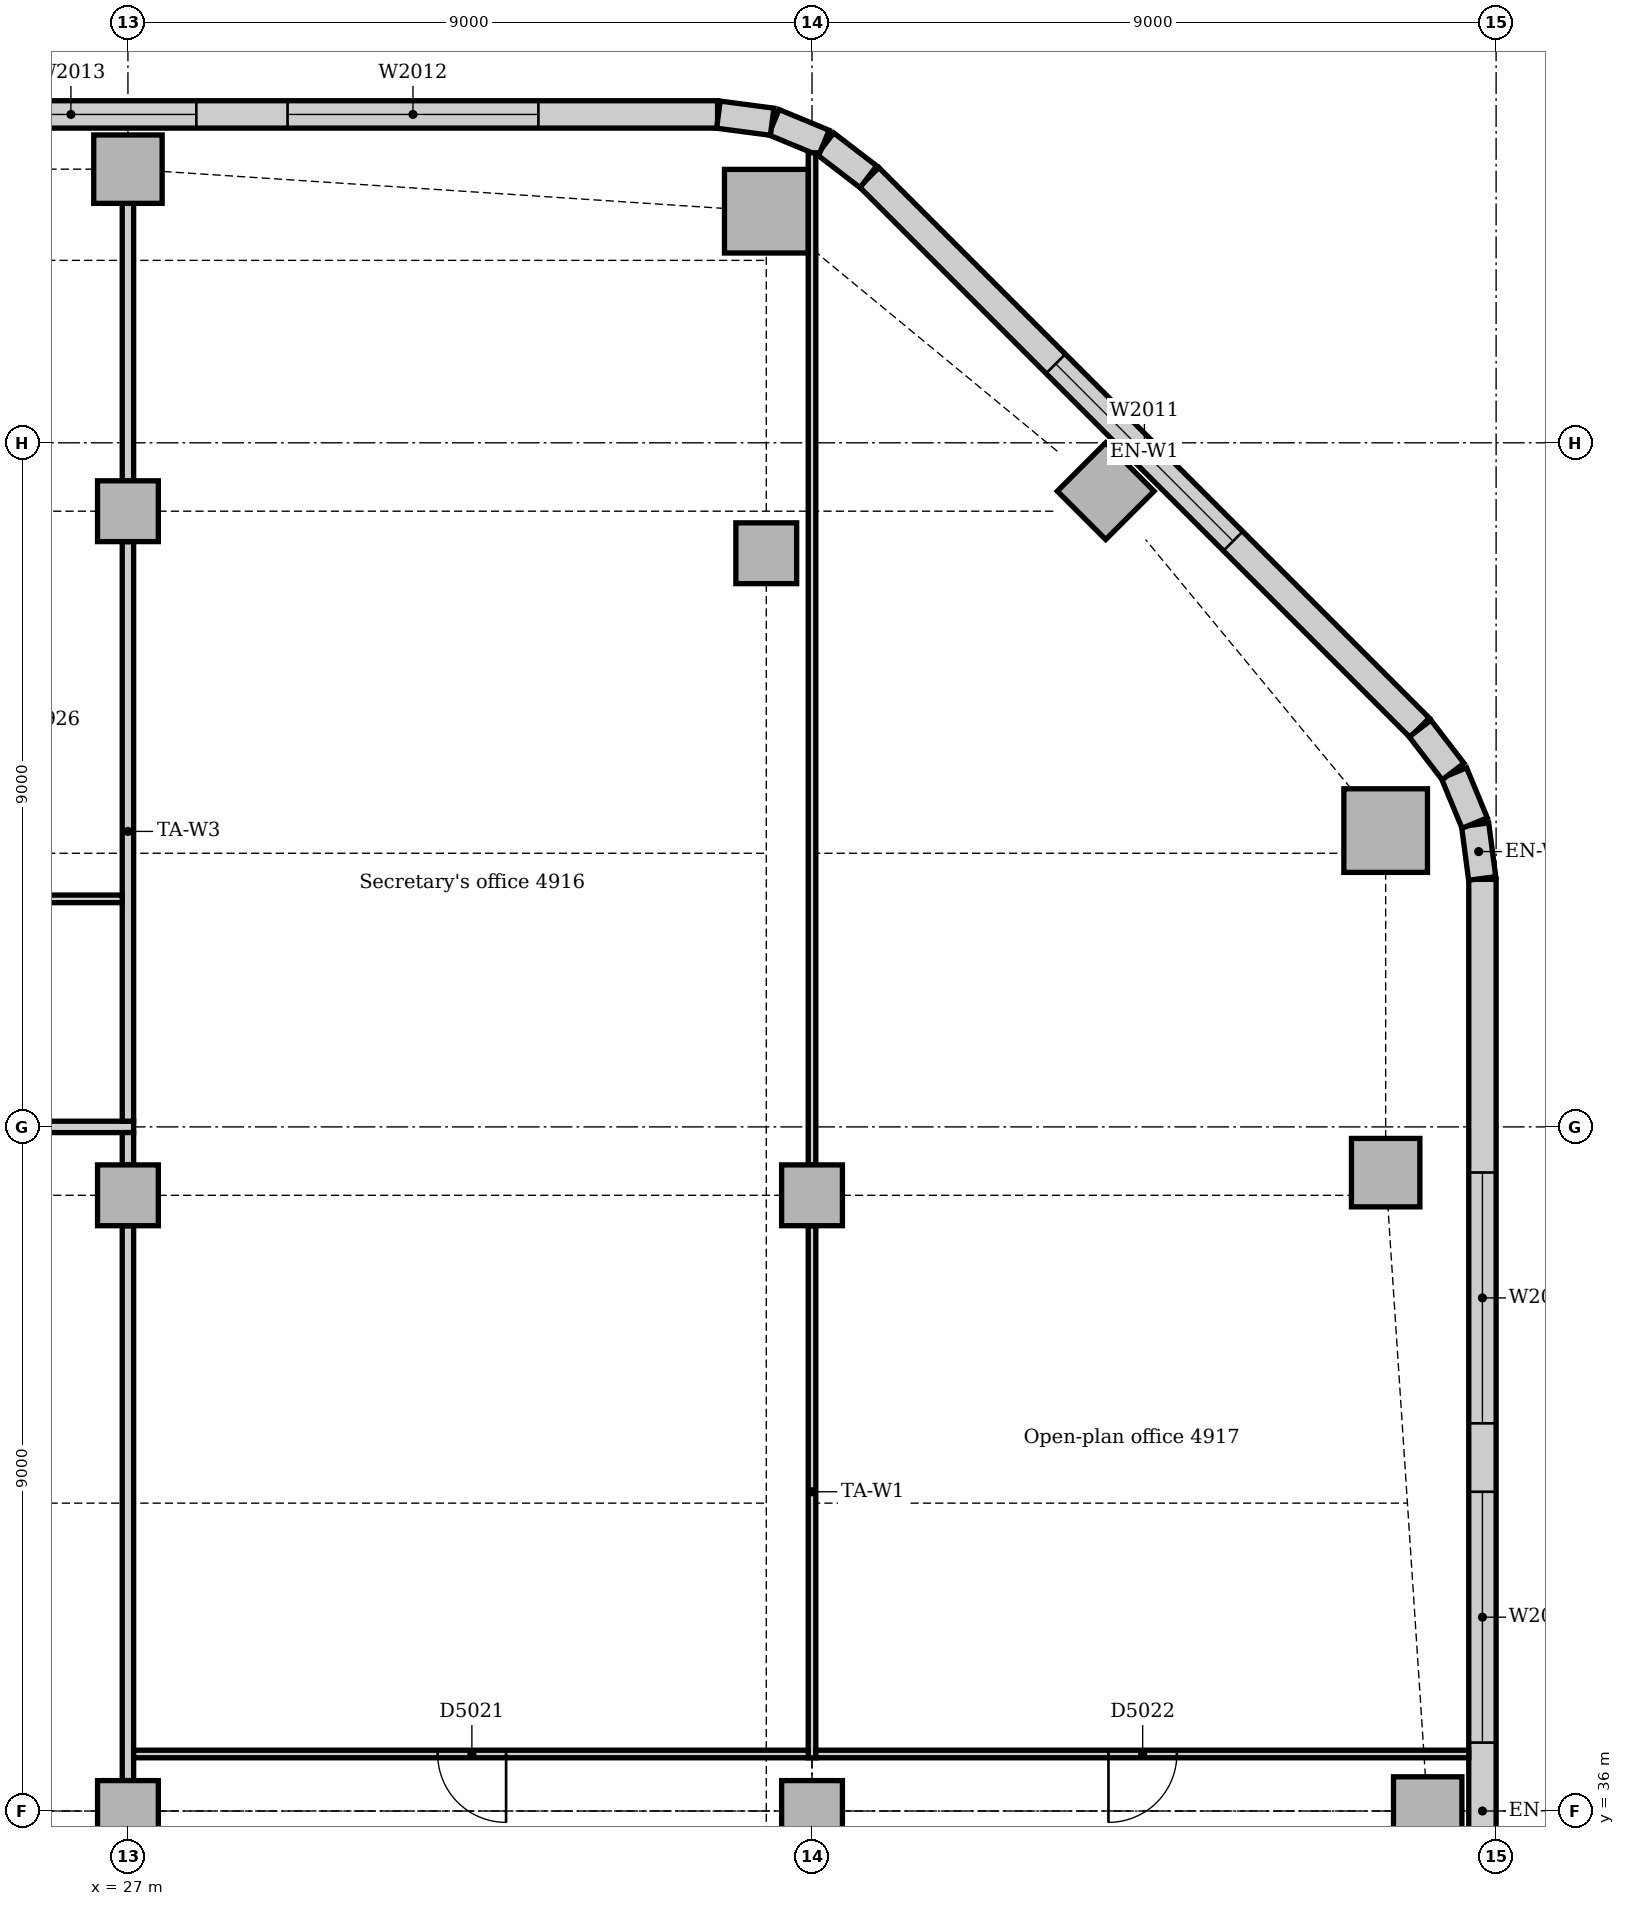
"""IFC4 building model, lengths in metres.
Left out: names, types, materials, properties, quantities, classifications, styles, units other than length and angle.
Written with IfcOpenShell. Run it as: python <this file> out.ifc"""

import sys

from ifc_helpers import new_model, si_unit, direction, frame, frame_2d, origin, origin_2d, place, context, subcontext, project, spatial, rectangle, extrude, element, fill, save


model = new_model("IFC4")
c1 = context("Model", 3, precision=1e-05, world=origin(), true_north=direction((0.0, 1.0)))
c2 = subcontext(c1, "Body", "Model", "MODEL_VIEW")
j1 = project(units=[si_unit("LENGTHUNIT", "METRE"), si_unit("PLANEANGLEUNIT", "RADIAN")], contexts=[c1])
p1 = place(None, origin())
s1 = spatial("IfcSite", under=j1, at=p1, CompositionType="ELEMENT")
p2 = place(p1, origin())
s2 = spatial("IfcBuilding", under=s1, at=p2, CompositionType="ELEMENT")
p3 = place(p2, frame((0.0, 0.0, 206.0)))
s3 = spatial("IfcBuildingStorey", under=s2, at=p3, CompositionType="ELEMENT", Elevation=206.0)
for number, where, z_axis, x_axis in (
    (1, (43.547, 48.898, 0.0), (0.0, 0.0, 1.0), (1.0, 0.0, 0.0)),
    (2, (35.398, 57.047, 0.0), (0.0, 0.0, 1.0), (1.0, 0.0, 0.0)),
):
    element("IfcColumn", number, at=place(p3, frame(where, z_axis=z_axis, x_axis=x_axis)), inside=s3, PredefinedType="COLUMN", context=c2, shape_type="SweptSolid", body=[
        extrude(rectangle(XDim=1.1, YDim=1.1, at=origin_2d()), origin(), (0.0, 0.0, 1.0), 3.85),
    ])
for number, where, z_axis, x_axis in (
    (3, (44.1, 36.0, 0.0), (0.0, 0.0, 1.0), (1.0, 0.0, 0.0)),
    (4, (43.547, 44.398, 0.0), (0.0, 0.0, 1.0), (1.0, 0.0, 0.0)),
    (5, (39.864, 53.364, 0.0), (0.0, 0.0, 1.0), (0.707, 0.707, 0.0)),
    (6, (27.0, 57.6, 0.0), (0.0, 0.0, 1.0), (1.0, 0.0, 0.0)),
):
    element("IfcColumn", number, at=place(p3, frame(where, z_axis=z_axis, x_axis=x_axis)), inside=s3, PredefinedType="COLUMN", context=c2, shape_type="SweptSolid", body=[
        extrude(rectangle(XDim=0.9, YDim=0.9, at=origin_2d()), origin(), (0.0, 0.0, 1.0), 3.85),
    ])
for number, where, z_axis, x_axis in (
    (7, (27.0, 36.0, 0.0), (0.0, 0.0, 1.0), (1.0, 0.0, 0.0)),
    (8, (27.0, 44.1, 0.0), (0.0, 0.0, 1.0), (1.0, 0.0, 0.0)),
    (9, (27.0, 53.1, 0.0), (0.0, 0.0, 1.0), (1.0, 0.0, 0.0)),
    (10, (36.0, 36.0, 0.0), (0.0, 0.0, 1.0), (1.0, 0.0, 0.0)),
    (11, (36.0, 44.1, 0.0), (0.0, 0.0, 1.0), (1.0, 0.0, 0.0)),
    (12, (35.398, 52.547, 0.0), (0.0, 0.0, 1.0), (1.0, 0.0, 0.0)),
):
    element("IfcColumn", number, at=place(p3, frame(where, z_axis=z_axis, x_axis=x_axis)), inside=s3, PredefinedType="COLUMN", context=c2, shape_type="SweptSolid", body=[
        extrude(rectangle(XDim=0.8, YDim=0.8, at=origin_2d()), origin(), (0.0, 0.0, 1.0), 3.85),
    ])
p4 = place(p3, frame((44.82, 23.743, 0.0), z_axis=(0.0, 0.0, 1.0), x_axis=(0.0, 1.0, 0.0)))
e13 = element("IfcWall", 13, at=p4, inside=s3, PredefinedType="STANDARD", context=c2, shape_type="SweptSolid", body=[
    extrude(rectangle(XDim=24.515, YDim=0.36, at=frame_2d((12.257, 0.0))), origin(), (0.0, 0.0, 1.0), 3.85),
])
p5 = place(p4, frame((3.857, 0.0, 0.9)))
e14 = element("IfcOpeningElement", 14, at=p5, cuts=e13, PredefinedType="OPENING", context=c2, shape_type="SweptSolid", body=[
    extrude(rectangle(XDim=3.3, YDim=1.6, at=frame_2d((1.65, 0.8))), frame((0.0, 0.19, 0.0), z_axis=(0.0, -1.0, 0.0), x_axis=(1.0, 0.0, 0.0)), (0.0, 0.0, 1.0), 0.38),
])
p6 = place(p4, frame((8.357, 0.0, 0.9)))
e15 = element("IfcOpeningElement", 15, at=p6, cuts=e13, PredefinedType="OPENING", context=c2, shape_type="SweptSolid", body=[
    extrude(rectangle(XDim=3.3, YDim=1.6, at=frame_2d((1.65, 0.8))), frame((0.0, 0.19, 0.0), z_axis=(0.0, -1.0, 0.0), x_axis=(1.0, 0.0, 0.0)), (0.0, 0.0, 1.0), 0.38),
])
p7 = place(p4, frame((13.157, 0.0, 0.9)))
e16 = element("IfcOpeningElement", 16, at=p7, cuts=e13, PredefinedType="OPENING", context=c2, shape_type="SweptSolid", body=[
    extrude(rectangle(XDim=3.3, YDim=1.6, at=frame_2d((1.65, 0.8))), frame((0.0, 0.19, 0.0), z_axis=(0.0, -1.0, 0.0), x_axis=(1.0, 0.0, 0.0)), (0.0, 0.0, 1.0), 0.38),
])
p8 = place(p4, frame((17.357, 0.0, 0.9)))
e17 = element("IfcOpeningElement", 17, at=p8, cuts=e13, PredefinedType="OPENING", context=c2, shape_type="SweptSolid", body=[
    extrude(rectangle(XDim=3.3, YDim=1.6, at=frame_2d((1.65, 0.8))), frame((0.0, 0.19, 0.0), z_axis=(0.0, -1.0, 0.0), x_axis=(1.0, 0.0, 0.0)), (0.0, 0.0, 1.0), 0.38),
])
p9 = place(p3, frame((43.994, 50.251, 0.0), z_axis=(0.0, 0.0, 1.0), x_axis=(-0.707106781187, 0.707106781187, 0.0)))
e18 = element("IfcWall", 18, at=p9, inside=s3, PredefinedType="STANDARD", context=c2, shape_type="SweptSolid", body=[
    extrude(rectangle(XDim=10.243, YDim=0.36, at=frame_2d((5.121, 0.0))), origin(), (0.0, 0.0, 1.0), 3.85),
])
p10 = place(p9, frame((3.471, 0.0, 0.9)))
e19 = element("IfcOpeningElement", 19, at=p10, cuts=e18, PredefinedType="OPENING", context=c2, shape_type="SweptSolid", body=[
    extrude(rectangle(XDim=3.3, YDim=1.6, at=frame_2d((1.65, 0.8))), frame((0.0, 0.19, 0.0), z_axis=(0.0, -1.0, 0.0), x_axis=(1.0, 0.0, 0.0)), (0.0, 0.0, 1.0), 0.38),
])
p11 = place(p3, frame((34.757, 58.32, 0.0), z_axis=(0.0, 0.0, 1.0), x_axis=(-1.0, 0.0, 0.0)))
e20 = element("IfcWall", 20, at=p11, inside=s3, PredefinedType="STANDARD", context=c2, shape_type="SweptSolid", body=[
    extrude(rectangle(XDim=30.515, YDim=0.36, at=frame_2d((15.257, 0.0))), origin(), (0.0, 0.0, 1.0), 3.85),
])
p12 = place(p11, frame((2.357, 0.0, 0.9)))
e21 = element("IfcOpeningElement", 21, at=p12, cuts=e20, PredefinedType="OPENING", context=c2, shape_type="SweptSolid", body=[
    extrude(rectangle(XDim=3.3, YDim=1.6, at=frame_2d((1.65, 0.8))), frame((0.0, 0.19, 0.0), z_axis=(0.0, -1.0, 0.0), x_axis=(1.0, 0.0, 0.0)), (0.0, 0.0, 1.0), 0.38),
])
p13 = place(p11, frame((6.857, 0.0, 0.9)))
e22 = element("IfcOpeningElement", 22, at=p13, cuts=e20, PredefinedType="OPENING", context=c2, shape_type="SweptSolid", body=[
    extrude(rectangle(XDim=3.3, YDim=1.6, at=frame_2d((1.65, 0.8))), frame((0.0, 0.19, 0.0), z_axis=(0.0, -1.0, 0.0), x_axis=(1.0, 0.0, 0.0)), (0.0, 0.0, 1.0), 0.38),
])
p14 = place(p11, frame((12.457, 0.0, 0.9)))
e23 = element("IfcOpeningElement", 23, at=p14, cuts=e20, PredefinedType="OPENING", context=c2, shape_type="SweptSolid", body=[
    extrude(rectangle(XDim=1.8, YDim=1.6, at=frame_2d((0.9, 0.8))), frame((0.0, 0.19, 0.0), z_axis=(0.0, -1.0, 0.0), x_axis=(1.0, 0.0, 0.0)), (0.0, 0.0, 1.0), 0.38),
])
p15 = place(p11, frame((15.857, 0.0, 0.9)))
e24 = element("IfcOpeningElement", 24, at=p15, cuts=e20, PredefinedType="OPENING", context=c2, shape_type="SweptSolid", body=[
    extrude(rectangle(XDim=3.3, YDim=1.6, at=frame_2d((1.65, 0.8))), frame((0.0, 0.19, 0.0), z_axis=(0.0, -1.0, 0.0), x_axis=(1.0, 0.0, 0.0)), (0.0, 0.0, 1.0), 0.38),
])
p16 = place(p11, frame((20.357, 0.0, 0.9)))
e25 = element("IfcOpeningElement", 25, at=p16, cuts=e20, PredefinedType="OPENING", context=c2, shape_type="SweptSolid", body=[
    extrude(rectangle(XDim=3.3, YDim=1.6, at=frame_2d((1.65, 0.8))), frame((0.0, 0.19, 0.0), z_axis=(0.0, -1.0, 0.0), x_axis=(1.0, 0.0, 0.0)), (0.0, 0.0, 1.0), 0.38),
])
p17 = place(p11, frame((24.857, 0.0, 0.9)))
e26 = element("IfcOpeningElement", 26, at=p17, cuts=e20, PredefinedType="OPENING", context=c2, shape_type="SweptSolid", body=[
    extrude(rectangle(XDim=3.3, YDim=1.6, at=frame_2d((1.65, 0.8))), frame((0.0, 0.19, 0.0), z_axis=(0.0, -1.0, 0.0), x_axis=(1.0, 0.0, 0.0)), (0.0, 0.0, 1.0), 0.38),
])
for number, where, z_axis, x_axis in (
    (27, (44.817, 48.269, 0.0), (0.0, 0.0, 1.0), (-0.131, 0.991, 0.0)),
    (28, (44.718, 48.997, 0.0), (0.0, 0.0, 1.0), (-0.383, 0.924, 0.0)),
):
    element("IfcWall", number, at=place(p3, frame(where, z_axis=z_axis, x_axis=x_axis)), inside=s3, PredefinedType="STANDARD", context=c2, shape_type="SweptSolid", body=[
        extrude(rectangle(XDim=0.713, YDim=0.36, at=frame_2d((0.356, 0.0))), origin(), (0.0, 0.0, 1.0), 3.85),
    ])
for number, where, z_axis, x_axis in (
    (29, (44.434, 49.675, 0.0), (0.0, 0.0, 1.0), (-0.609, 0.793, 0.0)),
    (30, (36.741, 57.5, 0.0), (0.0, 0.0, 1.0), (-0.793, 0.609, 0.0)),
):
    element("IfcWall", number, at=place(p3, frame(where, z_axis=z_axis, x_axis=x_axis)), inside=s3, PredefinedType="STANDARD", context=c2, shape_type="SweptSolid", body=[
        extrude(rectangle(XDim=0.713, YDim=0.36, at=frame_2d((0.357, 0.0))), origin(), (0.0, 0.0, 1.0), 3.85),
    ])
for number, where, z_axis, x_axis in (
    (31, (36.156, 57.945, 0.0), (0.0, 0.0, 1.0), (-0.924, 0.383, 0.0)),
    (32, (35.476, 58.224, 0.0), (0.0, 0.0, 1.0), (-0.991, 0.131, 0.0)),
):
    element("IfcWall", number, at=place(p3, frame(where, z_axis=z_axis, x_axis=x_axis)), inside=s3, PredefinedType="STANDARD", context=c2, shape_type="SweptSolid", body=[
        extrude(rectangle(XDim=0.713, YDim=0.36, at=frame_2d((0.356, 0.0))), origin(), (0.0, 0.0, 1.0), 3.85),
    ])
p18 = place(p3, frame((0.36, 45.0, 0.0), z_axis=(0.0, 0.0, 1.0), x_axis=(1.0, 0.0, 0.0)))
e33 = element("IfcWall", 33, at=p18, inside=s3, PredefinedType="PARTITIONING", context=c2, shape_type="SweptSolid", body=[
    extrude(rectangle(XDim=26.715, YDim=0.15, at=frame_2d((13.357, 0.0))), origin(), (0.0, 0.0, 1.0), 3.85),
])
p19 = place(p18, frame((9.05, 0.0, 0.0)))
e34 = element("IfcOpeningElement", 34, at=p19, cuts=e33, PredefinedType="OPENING", context=c2, shape_type="SweptSolid", body=[
    extrude(rectangle(XDim=0.9, YDim=2.1, at=frame_2d((0.45, 1.05))), frame((0.0, 0.085, 0.0), z_axis=(0.0, -1.0, 0.0), x_axis=(1.0, 0.0, 0.0)), (0.0, 0.0, 1.0), 0.17),
])
p20 = place(p18, frame((21.59, 0.0, 0.0)))
e35 = element("IfcOpeningElement", 35, at=p20, cuts=e33, PredefinedType="OPENING", context=c2, shape_type="SweptSolid", body=[
    extrude(rectangle(XDim=1.0, YDim=2.1, at=frame_2d((0.5, 1.05))), frame((0.0, 0.085, 0.0), z_axis=(0.0, -1.0, 0.0), x_axis=(1.0, 0.0, 0.0)), (0.0, 0.0, 1.0), 0.17),
])
p21 = place(p3, frame((27.0, 36.4, 0.0), z_axis=(0.0, 0.0, 1.0), x_axis=(0.0, 1.0, 0.0)))
e36 = element("IfcWall", 36, at=p21, inside=s3, PredefinedType="PARTITIONING", context=c2, shape_type="SweptSolid", body=[
    extrude(rectangle(XDim=7.3, YDim=0.15, at=frame_2d((3.65, 0.0))), origin(), (0.0, 0.0, 1.0), 3.35),
])
p22 = place(p3, frame((27.0, 44.5, 0.0), z_axis=(0.0, 0.0, 1.0), x_axis=(0.0, 1.0, 0.0)))
e37 = element("IfcWall", 37, at=p22, inside=s3, PredefinedType="PARTITIONING", context=c2, shape_type="SweptSolid", body=[
    extrude(rectangle(XDim=0.425, YDim=0.15, at=frame_2d((0.212, 0.0))), origin(), (0.0, 0.0, 1.0), 3.85),
])
p23 = place(p3, frame((27.0, 45.075, 0.0), z_axis=(0.0, 0.0, 1.0), x_axis=(0.0, 1.0, 0.0)))
e38 = element("IfcWall", 38, at=p23, inside=s3, PredefinedType="PARTITIONING", context=c2, shape_type="SweptSolid", body=[
    extrude(rectangle(XDim=7.625, YDim=0.15, at=frame_2d((3.812, 0.0))), origin(), (0.0, 0.0, 1.0), 3.35),
])
p24 = place(p3, frame((27.0, 53.5, 0.0), z_axis=(0.0, 0.0, 1.0), x_axis=(0.0, 1.0, 0.0)))
e39 = element("IfcWall", 39, at=p24, inside=s3, PredefinedType="PARTITIONING", context=c2, shape_type="SweptSolid", body=[
    extrude(rectangle(XDim=3.65, YDim=0.15, at=frame_2d((1.825, 0.0))), origin(), (0.0, 0.0, 1.0), 3.41),
])
p25 = place(p3, frame((36.0, 36.7, 0.0), z_axis=(0.0, 0.0, 1.0), x_axis=(0.0, 1.0, 0.0)))
e40 = element("IfcWall", 40, at=p25, inside=s3, PredefinedType="PARTITIONING", context=c2, shape_type="SweptSolid", body=[
    extrude(rectangle(XDim=7.0, YDim=0.1, at=frame_2d((3.5, 0.0))), origin(), (0.0, 0.0, 1.0), 3.35),
])
p26 = place(p3, frame((36.0, 44.5, 0.0), z_axis=(0.0, 0.0, 1.0), x_axis=(0.0, 1.0, 0.0)))
e41 = element("IfcWall", 41, at=p26, inside=s3, PredefinedType="PARTITIONING", context=c2, shape_type="SweptSolid", body=[
    extrude(rectangle(XDim=13.315, YDim=0.1, at=frame_2d((6.657, 0.0))), origin(), (0.0, 0.0, 1.0), 3.35),
])
p27 = place(p3, frame((27.075, 36.75, 0.0), z_axis=(0.0, 0.0, 1.0), x_axis=(1.0, 0.0, 0.0)))
e42 = element("IfcWall", 42, at=p27, inside=s3, PredefinedType="PARTITIONING", context=c2, shape_type="SweptSolid", body=[
    extrude(rectangle(XDim=8.875, YDim=0.1, at=frame_2d((4.438, 0.0))), origin(), (0.0, 0.0, 1.0), 3.85),
])
p28 = place(p27, frame((4.0, 0.0, 0.0)))
e43 = element("IfcOpeningElement", 43, at=p28, cuts=e42, PredefinedType="OPENING", context=c2, shape_type="SweptSolid", body=[
    extrude(rectangle(XDim=0.9, YDim=2.1, at=frame_2d((0.45, 1.05))), frame((0.0, 0.06, 0.0), z_axis=(0.0, -1.0, 0.0), x_axis=(1.0, 0.0, 0.0)), (0.0, 0.0, 1.0), 0.12),
])
p29 = place(p3, frame((36.05, 36.75, 0.0), z_axis=(0.0, 0.0, 1.0), x_axis=(1.0, 0.0, 0.0)))
e44 = element("IfcWall", 44, at=p29, inside=s3, PredefinedType="PARTITIONING", context=c2, shape_type="SweptSolid", body=[
    extrude(rectangle(XDim=8.59, YDim=0.1, at=frame_2d((4.295, 0.0))), origin(), (0.0, 0.0, 1.0), 3.85),
])
p30 = place(p29, frame((3.85, 0.0, 0.0)))
e45 = element("IfcOpeningElement", 45, at=p30, cuts=e44, PredefinedType="OPENING", context=c2, shape_type="SweptSolid", body=[
    extrude(rectangle(XDim=0.9, YDim=2.1, at=frame_2d((0.45, 1.05))), frame((0.0, 0.06, 0.0), z_axis=(0.0, -1.0, 0.0), x_axis=(1.0, 0.0, 0.0)), (0.0, 0.0, 1.0), 0.12),
])
p31 = place(p3, frame((22.55, 48.0, 0.0), z_axis=(0.0, 0.0, 1.0), x_axis=(1.0, 0.0, 0.0)))
e46 = element("IfcWall", 46, at=p31, inside=s3, PredefinedType="PARTITIONING", context=c2, shape_type="SweptSolid", body=[
    extrude(rectangle(XDim=4.375, YDim=0.1, at=frame_2d((2.188, 0.0))), origin(), (0.0, 0.0, 1.0), 3.85),
])
p32 = place(p31, frame((1.75, 0.0, 0.0)))
e47 = element("IfcOpeningElement", 47, at=p32, cuts=e46, PredefinedType="OPENING", context=c2, shape_type="SweptSolid", body=[
    extrude(rectangle(XDim=0.9, YDim=2.1, at=frame_2d((0.45, 1.05))), frame((0.0, 0.06, 0.0), z_axis=(0.0, -1.0, 0.0), x_axis=(1.0, 0.0, 0.0)), (0.0, 0.0, 1.0), 0.12),
])
p33 = place(p7, origin())
e48 = element("IfcWindow", 48, at=p33, inside=s3, PartitioningType="SINGLE_PANEL", PredefinedType="WINDOW", context=c2, shape_type="SweptSolid", body=[
    extrude(rectangle(XDim=3.3, YDim=1.6, at=frame_2d((1.65, 0.8))), frame((0.0, 0.13, 0.0), z_axis=(0.0, -1.0, 0.0), x_axis=(1.0, 0.0, 0.0)), (0.0, 0.0, 1.0), 0.06),
])
fill(e16, e48)
p34 = place(p8, origin())
e49 = element("IfcWindow", 49, at=p34, inside=s3, PartitioningType="SINGLE_PANEL", PredefinedType="WINDOW", context=c2, shape_type="SweptSolid", body=[
    extrude(rectangle(XDim=3.3, YDim=1.6, at=frame_2d((1.65, 0.8))), frame((0.0, 0.13, 0.0), z_axis=(0.0, -1.0, 0.0), x_axis=(1.0, 0.0, 0.0)), (0.0, 0.0, 1.0), 0.06),
])
fill(e17, e49)
p35 = place(p10, origin())
e50 = element("IfcWindow", 50, at=p35, inside=s3, PartitioningType="SINGLE_PANEL", PredefinedType="WINDOW", context=c2, shape_type="SweptSolid", body=[
    extrude(rectangle(XDim=3.3, YDim=1.6, at=frame_2d((1.65, 0.8))), frame((0.0, 0.13, 0.0), z_axis=(0.0, -1.0, 0.0), x_axis=(1.0, 0.0, 0.0)), (0.0, 0.0, 1.0), 0.06),
])
fill(e19, e50)
p36 = place(p12, origin())
e51 = element("IfcWindow", 51, at=p36, inside=s3, PartitioningType="SINGLE_PANEL", PredefinedType="WINDOW", context=c2, shape_type="SweptSolid", body=[
    extrude(rectangle(XDim=3.3, YDim=1.6, at=frame_2d((1.65, 0.8))), frame((0.0, 0.13, 0.0), z_axis=(0.0, -1.0, 0.0), x_axis=(1.0, 0.0, 0.0)), (0.0, 0.0, 1.0), 0.06),
])
fill(e21, e51)
p37 = place(p13, origin())
e52 = element("IfcWindow", 52, at=p37, inside=s3, PartitioningType="SINGLE_PANEL", PredefinedType="WINDOW", context=c2, shape_type="SweptSolid", body=[
    extrude(rectangle(XDim=3.3, YDim=1.6, at=frame_2d((1.65, 0.8))), frame((0.0, 0.13, 0.0), z_axis=(0.0, -1.0, 0.0), x_axis=(1.0, 0.0, 0.0)), (0.0, 0.0, 1.0), 0.06),
])
fill(e22, e52)
p38 = place(p28, frame((0.9, 0.0, 0.0), z_axis=(0.0, 0.0, 1.0), x_axis=(-1.0, 0.0, 0.0)))
e53 = element("IfcDoor", 53, at=p38, inside=s3, OperationType="SINGLE_SWING_LEFT", PredefinedType="DOOR", context=c2, shape_type="SweptSolid", body=[
    extrude(rectangle(XDim=0.9, YDim=2.1, at=frame_2d((0.45, 1.05))), frame((0.0, 0.025, 0.0), z_axis=(0.0, -1.0, 0.0), x_axis=(1.0, 0.0, 0.0)), (0.0, 0.0, 1.0), 0.05),
])
fill(e43, e53)
p39 = place(p30, frame((0.9, 0.0, 0.0), z_axis=(0.0, 0.0, 1.0), x_axis=(-1.0, 0.0, 0.0)))
e54 = element("IfcDoor", 54, at=p39, inside=s3, OperationType="SINGLE_SWING_RIGHT", PredefinedType="DOOR", context=c2, shape_type="SweptSolid", body=[
    extrude(rectangle(XDim=0.9, YDim=2.1, at=frame_2d((0.45, 1.05))), frame((0.0, 0.025, 0.0), z_axis=(0.0, -1.0, 0.0), x_axis=(1.0, 0.0, 0.0)), (0.0, 0.0, 1.0), 0.05),
])
fill(e45, e54)
save(model, sys.argv[1])
